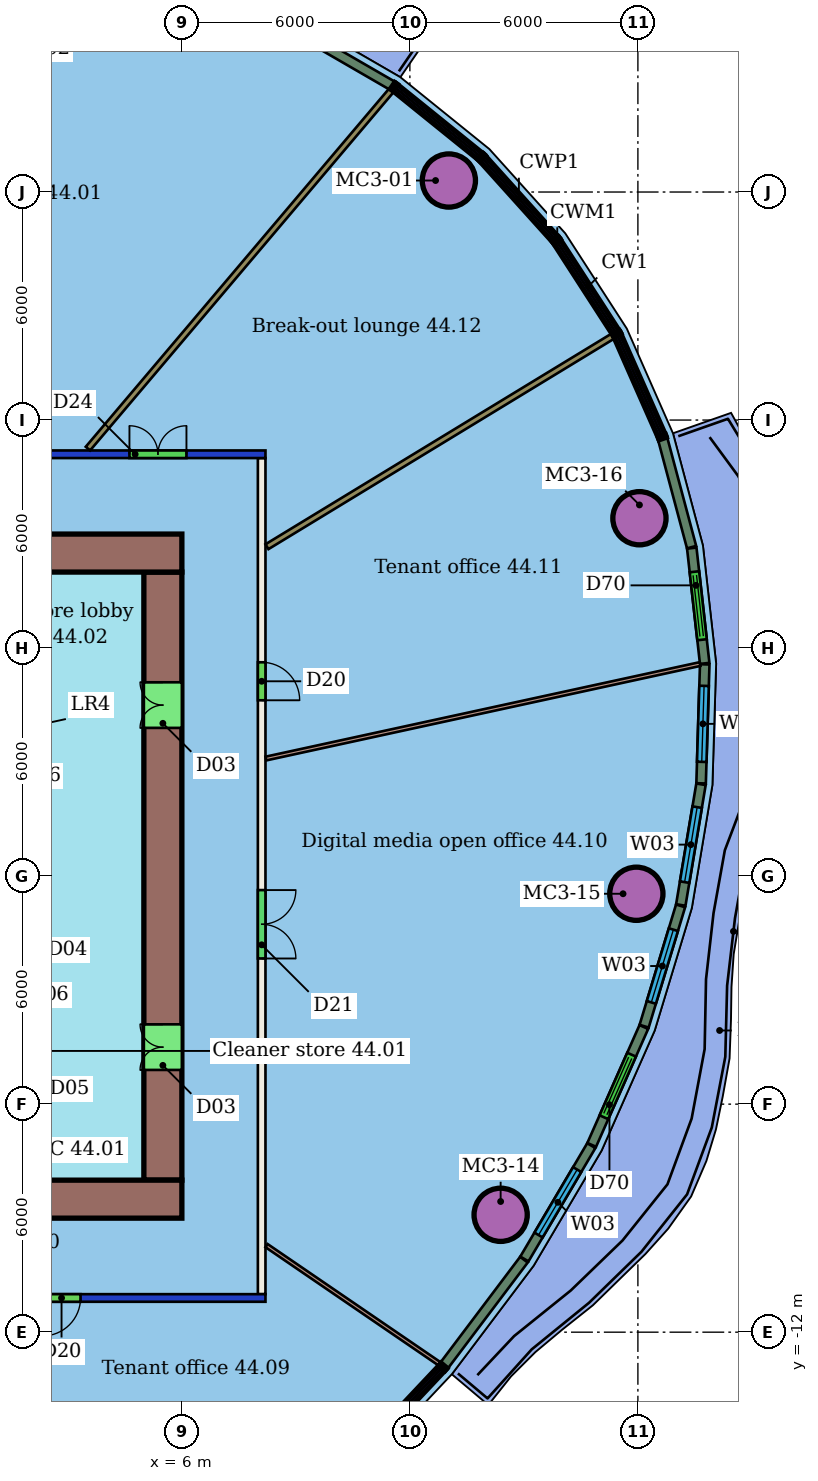
"""IFC4 building model, lengths in metres.
Left out: names, types, materials, properties, quantities, classifications, styles, units other than length and angle.
Written with IfcOpenShell. Run it as: python <this file> out.ifc"""

import sys

from ifc_helpers import new_model, si_unit, direction, frame, frame_2d, origin, origin_2d, place, context, subcontext, project, spatial, rectangle, hollow_circle, extrude, element, fill, save


model = new_model("IFC4")
c1 = context("Model", 3, precision=1e-05, world=origin(), true_north=direction((0.0, 1.0)))
c2 = subcontext(c1, "Body", "Model", "MODEL_VIEW")
j1 = project(units=[si_unit("LENGTHUNIT", "METRE"), si_unit("PLANEANGLEUNIT", "RADIAN")], contexts=[c1])
p1 = place(None, origin())
s1 = spatial("IfcSite", under=j1, at=p1, CompositionType="ELEMENT")
p2 = place(p1, origin())
s2 = spatial("IfcBuilding", under=s1, at=p2, CompositionType="ELEMENT")
p3 = place(p2, frame((0.0, 0.0, 183.0)))
s3 = spatial("IfcBuildingStorey", under=s2, at=p3, CompositionType="ELEMENT", Elevation=183.0)
for number, where, z_axis, x_axis in (
    (1, (13.026, 18.303, 0.0), (0.0, 0.0, 1.0), (1.0, 0.0, 0.0)),
    (2, (14.388, -8.912, 0.0), (0.0, 0.0, 1.0), (1.0, 0.0, 0.0)),
    (3, (17.959, -0.464, 0.0), (0.0, 0.0, 1.0), (1.0, 0.0, 0.0)),
    (4, (18.041, 9.417, 0.0), (0.0, 0.0, 1.0), (1.0, 0.0, 0.0)),
):
    element("IfcColumn", number, at=place(p3, frame(where, z_axis=z_axis, x_axis=x_axis)), inside=s3, PredefinedType="COLUMN", context=c2, shape_type="SweptSolid", body=[
        extrude(hollow_circle(Radius=0.7, WallThickness=0.05, at=origin_2d()), origin(), (0.0, 0.0, 1.0), 3.45),
    ])
p4 = place(p3, frame((8.2, -11.1, 0.0), z_axis=(0.0, 0.0, 1.0), x_axis=(-1.0, 0.0, 0.0)))
e5 = element("IfcWall", 5, at=p4, inside=s3, PredefinedType="PARTITIONING", context=c2, shape_type="SweptSolid", body=[
    extrude(rectangle(XDim=28.4, YDim=0.2, at=frame_2d((14.2, 0.0))), origin(), (0.0, 0.0, 1.0), 3.05),
])
p5 = place(p4, frame((22.184, 0.0, 0.0)))
e6 = element("IfcOpeningElement", 6, at=p5, cuts=e5, PredefinedType="OPENING", context=c2, shape_type="SweptSolid", body=[
    extrude(rectangle(XDim=1.8, YDim=2.1, at=frame_2d((0.9, 1.05))), frame((0.0, 0.11, 0.0), z_axis=(0.0, -1.0, 0.0), x_axis=(1.0, 0.0, 0.0)), (0.0, 0.0, 1.0), 0.22),
])
p6 = place(p4, frame((15.038, 0.0, 0.0)))
e7 = element("IfcOpeningElement", 7, at=p6, cuts=e5, PredefinedType="OPENING", context=c2, shape_type="SweptSolid", body=[
    extrude(rectangle(XDim=1.8, YDim=2.1, at=frame_2d((0.9, 1.05))), frame((0.0, 0.11, 0.0), z_axis=(0.0, -1.0, 0.0), x_axis=(1.0, 0.0, 0.0)), (0.0, 0.0, 1.0), 0.22),
])
p7 = place(p4, frame((4.866, 0.0, 0.0)))
e8 = element("IfcOpeningElement", 8, at=p7, cuts=e5, PredefinedType="OPENING", context=c2, shape_type="SweptSolid", body=[
    extrude(rectangle(XDim=1.0, YDim=2.1, at=frame_2d((0.5, 1.05))), frame((0.0, 0.11, 0.0), z_axis=(0.0, -1.0, 0.0), x_axis=(1.0, 0.0, 0.0)), (0.0, 0.0, 1.0), 0.22),
])
p8 = place(p3, frame((-20.2, 11.1, 0.0), z_axis=(0.0, 0.0, 1.0), x_axis=(1.0, 0.0, 0.0)))
e9 = element("IfcWall", 9, at=p8, inside=s3, PredefinedType="PARTITIONING", context=c2, shape_type="SweptSolid", body=[
    extrude(rectangle(XDim=28.4, YDim=0.2, at=frame_2d((14.2, 0.0))), origin(), (0.0, 0.0, 1.0), 3.05),
])
p9 = place(p8, frame((19.288, 0.0, 0.0)))
e10 = element("IfcOpeningElement", 10, at=p9, cuts=e9, PredefinedType="OPENING", context=c2, shape_type="SweptSolid", body=[
    extrude(rectangle(XDim=1.8, YDim=2.1, at=frame_2d((0.9, 1.05))), frame((0.0, 0.11, 0.0), z_axis=(0.0, -1.0, 0.0), x_axis=(1.0, 0.0, 0.0)), (0.0, 0.0, 1.0), 0.22),
])
p10 = place(p8, frame((9.583, 0.0, 0.0)))
e11 = element("IfcOpeningElement", 11, at=p10, cuts=e9, PredefinedType="OPENING", context=c2, shape_type="SweptSolid", body=[
    extrude(rectangle(XDim=1.5, YDim=2.1, at=frame_2d((0.75, 1.05))), frame((0.0, 0.11, 0.0), z_axis=(0.0, -1.0, 0.0), x_axis=(1.0, 0.0, 0.0)), (0.0, 0.0, 1.0), 0.22),
])
p11 = place(p8, frame((4.896, 0.0, 0.0)))
e12 = element("IfcOpeningElement", 12, at=p11, cuts=e9, PredefinedType="OPENING", context=c2, shape_type="SweptSolid", body=[
    extrude(rectangle(XDim=0.9, YDim=2.1, at=frame_2d((0.45, 1.05))), frame((0.0, 0.11, 0.0), z_axis=(0.0, -1.0, 0.0), x_axis=(1.0, 0.0, 0.0)), (0.0, 0.0, 1.0), 0.22),
])
p12 = place(p8, frame((24.821, 0.0, 0.0)))
e13 = element("IfcOpeningElement", 13, at=p12, cuts=e9, PredefinedType="OPENING", context=c2, shape_type="SweptSolid", body=[
    extrude(rectangle(XDim=1.5, YDim=2.1, at=frame_2d((0.75, 1.05))), frame((0.0, 0.11, 0.0), z_axis=(0.0, -1.0, 0.0), x_axis=(1.0, 0.0, 0.0)), (0.0, 0.0, 1.0), 0.22),
])
p13 = place(p3, frame((8.1, 11.0, 0.0), z_axis=(0.0, 0.0, 1.0), x_axis=(0.0, -1.0, 0.0)))
e14 = element("IfcWall", 14, at=p13, inside=s3, PredefinedType="PARTITIONING", context=c2, shape_type="SweptSolid", body=[
    extrude(rectangle(XDim=22.0, YDim=0.2, at=frame_2d((11.0, 0.0))), origin(), (0.0, 0.0, 1.0), 3.45),
])
p14 = place(p13, frame((11.367, 0.0, 0.0)))
e15 = element("IfcOpeningElement", 15, at=p14, cuts=e14, PredefinedType="OPENING", context=c2, shape_type="SweptSolid", body=[
    extrude(rectangle(XDim=1.8, YDim=2.1, at=frame_2d((0.9, 1.05))), frame((0.0, 0.11, 0.0), z_axis=(0.0, -1.0, 0.0), x_axis=(1.0, 0.0, 0.0)), (0.0, 0.0, 1.0), 0.22),
])
p15 = place(p13, frame((5.373, 0.0, 0.0)))
e16 = element("IfcOpeningElement", 16, at=p15, cuts=e14, PredefinedType="OPENING", context=c2, shape_type="SweptSolid", body=[
    extrude(rectangle(XDim=1.0, YDim=2.1, at=frame_2d((0.5, 1.05))), frame((0.0, 0.11, 0.0), z_axis=(0.0, -1.0, 0.0), x_axis=(1.0, 0.0, 0.0)), (0.0, 0.0, 1.0), 0.22),
])
p16 = place(p3, frame((11.509, 20.671, 0.0), z_axis=(0.0, 0.0, 1.0), x_axis=(-0.646338339336, -0.763050949219, 0.0)))
e17 = element("IfcWall", 17, at=p16, inside=s3, PredefinedType="PARTITIONING", context=c2, shape_type="SweptSolid", body=[
    extrude(rectangle(XDim=12.348, YDim=0.15, at=frame_2d((6.174, 0.0))), origin(), (0.0, 0.0, 1.0), 3.45),
])
p17 = place(p3, frame((4.636, -19.79, 0.0), z_axis=(0.0, 0.0, 1.0), x_axis=(-0.473408054694, 0.880843240169, 0.0)))
e18 = element("IfcWall", 18, at=p17, inside=s3, PredefinedType="PARTITIONING", context=c2, shape_type="SweptSolid", body=[
    extrude(rectangle(XDim=9.725, YDim=0.1, at=frame_2d((4.863, 0.0))), origin(), (0.0, 0.0, 1.0), 3.45),
])
p18 = place(p3, frame((12.779, -12.832, 0.0), z_axis=(0.0, 0.0, 1.0), x_axis=(-0.825651519224, 0.564180439933, 0.0)))
e19 = element("IfcWall", 19, at=p18, inside=s3, PredefinedType="PARTITIONING", context=c2, shape_type="SweptSolid", body=[
    extrude(rectangle(XDim=5.512, YDim=0.1, at=frame_2d((2.756, 0.0))), origin(), (0.0, 0.0, 1.0), 3.45),
])
p19 = place(p3, frame((19.634, 5.58, 0.0), z_axis=(0.0, 0.0, 1.0), x_axis=(-0.977119787855, -0.212689727497, 0.0)))
e20 = element("IfcWall", 20, at=p19, inside=s3, PredefinedType="PARTITIONING", context=c2, shape_type="SweptSolid", body=[
    extrude(rectangle(XDim=11.691, YDim=0.1, at=frame_2d((5.846, 0.0))), origin(), (0.0, 0.0, 1.0), 3.45),
])
p20 = place(p3, frame((17.335, 14.204, 0.0), z_axis=(0.0, 0.0, 1.0), x_axis=(-0.854194128167, -0.51995422049, 0.0)))
e21 = element("IfcWall", 21, at=p20, inside=s3, PredefinedType="PARTITIONING", context=c2, shape_type="SweptSolid", body=[
    extrude(rectangle(XDim=10.648, YDim=0.15, at=frame_2d((5.324, 0.0))), origin(), (0.0, 0.0, 1.0), 3.45),
])
p21 = place(p3, frame((11.532, 20.801, 0.0), z_axis=(0.0, 0.0, 1.0), x_axis=(-0.865519049877, 0.500876006912, 0.0)))
e22 = element("IfcWall", 22, at=p21, inside=s3, PredefinedType="SOLIDWALL", context=c2, shape_type="SweptSolid", body=[
    extrude(rectangle(XDim=2.943, YDim=0.25, at=frame_2d((1.471, 0.0))), origin(), (0.0, 0.0, 1.0), 3.1),
])
p22 = place(p3, frame((12.908, -12.869, 0.0), z_axis=(0.0, 0.0, 1.0), x_axis=(0.602031278038, 0.798472504388, 0.0)))
e23 = element("IfcWall", 23, at=p22, inside=s3, PredefinedType="SOLIDWALL", context=c2, shape_type="SweptSolid", body=[
    extrude(rectangle(XDim=3.477, YDim=0.25, at=frame_2d((1.739, 0.0))), origin(), (0.0, 0.0, 1.0), 3.1),
])
p23 = place(p3, frame((15.013, -10.074, 0.0), z_axis=(0.0, 0.0, 1.0), x_axis=(0.508356425064, 0.861146761648, 0.0)))
e24 = element("IfcWall", 24, at=p23, inside=s3, PredefinedType="SOLIDWALL", context=c2, shape_type="SweptSolid", body=[
    extrude(rectangle(XDim=3.464, YDim=0.25, at=frame_2d((1.732, 0.0))), origin(), (0.0, 0.0, 1.0), 3.1),
])
p24 = place(p23, frame((0.732, 0.0, 0.9)))
e25 = element("IfcOpeningElement", 25, at=p24, cuts=e24, PredefinedType="OPENING", context=c2, shape_type="SweptSolid", body=[
    extrude(rectangle(XDim=2.0, YDim=2.1, at=frame_2d((1.0, 1.05))), frame((0.0, 0.135, 0.0), z_axis=(0.0, -1.0, 0.0), x_axis=(1.0, 0.0, 0.0)), (0.0, 0.0, 1.0), 0.27),
])
p25 = place(p3, frame((16.784, -7.072, 0.0), z_axis=(0.0, 0.0, 1.0), x_axis=(0.404494434215, 0.914540459843, 0.0)))
e26 = element("IfcWall", 26, at=p25, inside=s3, PredefinedType="SOLIDWALL", context=c2, shape_type="SweptSolid", body=[
    extrude(rectangle(XDim=3.391, YDim=0.25, at=frame_2d((1.695, 0.0))), origin(), (0.0, 0.0, 1.0), 3.1),
])
p26 = place(p25, frame((0.795, 0.0, 0.0)))
e27 = element("IfcOpeningElement", 27, at=p26, cuts=e26, PredefinedType="OPENING", context=c2, shape_type="SweptSolid", body=[
    extrude(rectangle(XDim=1.8, YDim=2.4, at=frame_2d((0.9, 1.2))), frame((0.0, 0.135, 0.0), z_axis=(0.0, -1.0, 0.0), x_axis=(1.0, 0.0, 0.0)), (0.0, 0.0, 1.0), 0.27),
])
p27 = place(p3, frame((18.164, -3.949, 0.0), z_axis=(0.0, 0.0, 1.0), x_axis=(0.290048362563, 0.957011989149, 0.0)))
e28 = element("IfcWall", 28, at=p27, inside=s3, PredefinedType="SOLIDWALL", context=c2, shape_type="SweptSolid", body=[
    extrude(rectangle(XDim=3.308, YDim=0.25, at=frame_2d((1.654, 0.0))), origin(), (0.0, 0.0, 1.0), 3.1),
])
p28 = place(p27, frame((0.654, 0.0, 0.9)))
e29 = element("IfcOpeningElement", 29, at=p28, cuts=e28, PredefinedType="OPENING", context=c2, shape_type="SweptSolid", body=[
    extrude(rectangle(XDim=2.0, YDim=2.1, at=frame_2d((1.0, 1.05))), frame((0.0, 0.135, 0.0), z_axis=(0.0, -1.0, 0.0), x_axis=(1.0, 0.0, 0.0)), (0.0, 0.0, 1.0), 0.27),
])
p29 = place(p3, frame((19.129, -0.76, 0.0), z_axis=(0.0, 0.0, 1.0), x_axis=(0.165062898456, 0.986283042313, 0.0)))
e30 = element("IfcWall", 30, at=p29, inside=s3, PredefinedType="SOLIDWALL", context=c2, shape_type="SweptSolid", body=[
    extrude(rectangle(XDim=3.22, YDim=0.25, at=frame_2d((1.61, 0.0))), origin(), (0.0, 0.0, 1.0), 3.1),
])
p30 = place(p29, frame((0.61, 0.0, 0.9)))
e31 = element("IfcOpeningElement", 31, at=p30, cuts=e30, PredefinedType="OPENING", context=c2, shape_type="SweptSolid", body=[
    extrude(rectangle(XDim=2.0, YDim=2.1, at=frame_2d((1.0, 1.05))), frame((0.0, 0.135, 0.0), z_axis=(0.0, -1.0, 0.0), x_axis=(1.0, 0.0, 0.0)), (0.0, 0.0, 1.0), 0.27),
])
p31 = place(p3, frame((19.663, 2.441, 0.0), z_axis=(0.0, 0.0, 1.0), x_axis=(0.030631283966, 0.999530752125, 0.0)))
e32 = element("IfcWall", 32, at=p31, inside=s3, PredefinedType="SOLIDWALL", context=c2, shape_type="SweptSolid", body=[
    extrude(rectangle(XDim=3.132, YDim=0.25, at=frame_2d((1.566, 0.0))), origin(), (0.0, 0.0, 1.0), 3.1),
])
p32 = place(p31, frame((0.566, 0.0, 0.9)))
e33 = element("IfcOpeningElement", 33, at=p32, cuts=e32, PredefinedType="OPENING", context=c2, shape_type="SweptSolid", body=[
    extrude(rectangle(XDim=2.0, YDim=2.1, at=frame_2d((1.0, 1.05))), frame((0.0, 0.135, 0.0), z_axis=(0.0, -1.0, 0.0), x_axis=(1.0, 0.0, 0.0)), (0.0, 0.0, 1.0), 0.27),
])
p33 = place(p3, frame((19.758, 5.597, 0.0), z_axis=(0.0, 0.0, 1.0), x_axis=(-0.111450096945, 0.993770031693, 0.0)))
e34 = element("IfcWall", 34, at=p33, inside=s3, PredefinedType="SOLIDWALL", context=c2, shape_type="SweptSolid", body=[
    extrude(rectangle(XDim=3.052, YDim=0.25, at=frame_2d((1.526, 0.0))), origin(), (0.0, 0.0, 1.0), 3.1),
])
p34 = place(p33, frame((0.626, 0.0, 0.0)))
e35 = element("IfcOpeningElement", 35, at=p34, cuts=e34, PredefinedType="OPENING", context=c2, shape_type="SweptSolid", body=[
    extrude(rectangle(XDim=1.8, YDim=2.4, at=frame_2d((0.9, 1.2))), frame((0.0, 0.135, 0.0), z_axis=(0.0, -1.0, 0.0), x_axis=(1.0, 0.0, 0.0)), (0.0, 0.0, 1.0), 0.27),
])
p35 = place(p3, frame((19.413, 8.656, 0.0), z_axis=(0.0, 0.0, 1.0), x_axis=(-0.257791752942, 0.966200503061, 0.0)))
e36 = element("IfcWall", 36, at=p35, inside=s3, PredefinedType="SOLIDWALL", context=c2, shape_type="SweptSolid", body=[
    extrude(rectangle(XDim=2.942, YDim=0.25, at=frame_2d((1.471, 0.0))), origin(), (0.0, 0.0, 1.0), 3.1),
])
p36 = place(p3, frame((6.0, 8.5, 0.0), z_axis=(0.0, 0.0, 1.0), x_axis=(-1.0, 0.0, 0.0)))
e37 = element("IfcWall", 37, at=p36, inside=s3, PredefinedType="SHEAR", context=c2, shape_type="SweptSolid", body=[
    extrude(rectangle(XDim=12.0, YDim=1.0, at=frame_2d((6.0, 0.0))), origin(), (0.0, 0.0, 1.0), 3.3),
])
p37 = place(p36, frame((5.6, 0.0, 0.0)))
e38 = element("IfcOpeningElement", 38, at=p37, cuts=e37, PredefinedType="OPENING", context=c2, shape_type="SweptSolid", body=[
    extrude(rectangle(XDim=1.2, YDim=2.1, at=frame_2d((0.6, 1.05))), frame((0.0, 0.51, 0.0), z_axis=(0.0, -1.0, 0.0), x_axis=(1.0, 0.0, 0.0)), (0.0, 0.0, 1.0), 1.02),
])
p38 = place(p3, frame((-18.0, -8.5, 0.0), z_axis=(0.0, 0.0, 1.0), x_axis=(1.0, 0.0, 0.0)))
e39 = element("IfcWall", 39, at=p38, inside=s3, PredefinedType="SHEAR", context=c2, shape_type="SweptSolid", body=[
    extrude(rectangle(XDim=24.0, YDim=1.0, at=frame_2d((12.0, 0.0))), origin(), (0.0, 0.0, 1.0), 3.3),
])
p39 = place(p38, frame((6.0, 0.0, 0.0)))
e40 = element("IfcOpeningElement", 40, at=p39, cuts=e39, PredefinedType="OPENING", context=c2, shape_type="SweptSolid", body=[
    extrude(rectangle(XDim=1.2, YDim=2.1, at=frame_2d((0.6, 1.05))), frame((0.0, 0.51, 0.0), z_axis=(0.0, -1.0, 0.0), x_axis=(1.0, 0.0, 0.0)), (0.0, 0.0, 1.0), 1.02),
])
p40 = place(p3, frame((5.5, -8.0, 0.0), z_axis=(0.0, 0.0, 1.0), x_axis=(0.0, 1.0, 0.0)))
e41 = element("IfcWall", 41, at=p40, inside=s3, PredefinedType="SHEAR", context=c2, shape_type="SweptSolid", body=[
    extrude(rectangle(XDim=16.0, YDim=1.0, at=frame_2d((8.0, 0.0))), origin(), (0.0, 0.0, 1.0), 3.3),
])
p41 = place(p40, frame((2.9, 0.0, 0.0)))
e42 = element("IfcOpeningElement", 42, at=p41, cuts=e41, PredefinedType="OPENING", context=c2, shape_type="SweptSolid", body=[
    extrude(rectangle(XDim=1.2, YDim=2.1, at=frame_2d((0.6, 1.05))), frame((0.0, 0.51, 0.0), z_axis=(0.0, -1.0, 0.0), x_axis=(1.0, 0.0, 0.0)), (0.0, 0.0, 1.0), 1.02),
])
p42 = place(p40, frame((11.9, 0.0, 0.0)))
e43 = element("IfcOpeningElement", 43, at=p42, cuts=e41, PredefinedType="OPENING", context=c2, shape_type="SweptSolid", body=[
    extrude(rectangle(XDim=1.2, YDim=2.1, at=frame_2d((0.6, 1.05))), frame((0.0, 0.51, 0.0), z_axis=(0.0, -1.0, 0.0), x_axis=(1.0, 0.0, 0.0)), (0.0, 0.0, 1.0), 1.02),
])
p43 = place(p7, origin())
e44 = element("IfcDoor", 44, at=p43, inside=s3, OperationType="SINGLE_SWING_RIGHT", PredefinedType="DOOR", context=c2, shape_type="SweptSolid", body=[
    extrude(rectangle(XDim=1.0, YDim=2.1, at=frame_2d((0.5, 1.05))), frame((0.0, 0.025, 0.0), z_axis=(0.0, -1.0, 0.0), x_axis=(1.0, 0.0, 0.0)), (0.0, 0.0, 1.0), 0.05),
])
fill(e8, e44)
p44 = place(p14, origin())
e45 = element("IfcDoor", 45, at=p44, inside=s3, OperationType="DOUBLE_DOOR_SINGLE_SWING", PredefinedType="DOOR", context=c2, shape_type="SweptSolid", body=[
    extrude(rectangle(XDim=1.8, YDim=2.1, at=frame_2d((0.9, 1.05))), frame((0.0, 0.025, 0.0), z_axis=(0.0, -1.0, 0.0), x_axis=(1.0, 0.0, 0.0)), (0.0, 0.0, 1.0), 0.05),
])
fill(e15, e45)
p45 = place(p15, origin())
e46 = element("IfcDoor", 46, at=p45, inside=s3, OperationType="SINGLE_SWING_RIGHT", PredefinedType="DOOR", context=c2, shape_type="SweptSolid", body=[
    extrude(rectangle(XDim=1.0, YDim=2.1, at=frame_2d((0.5, 1.05))), frame((0.0, 0.025, 0.0), z_axis=(0.0, -1.0, 0.0), x_axis=(1.0, 0.0, 0.0)), (0.0, 0.0, 1.0), 0.05),
])
fill(e16, e46)
p46 = place(p12, origin())
e47 = element("IfcDoor", 47, at=p46, inside=s3, OperationType="DOUBLE_DOOR_SINGLE_SWING", PredefinedType="DOOR", context=c2, shape_type="SweptSolid", body=[
    extrude(rectangle(XDim=1.5, YDim=2.1, at=frame_2d((0.75, 1.05))), frame((0.0, 0.025, 0.0), z_axis=(0.0, -1.0, 0.0), x_axis=(1.0, 0.0, 0.0)), (0.0, 0.0, 1.0), 0.05),
])
fill(e13, e47)
p47 = place(p24, origin())
e48 = element("IfcWindow", 48, at=p47, inside=s3, PartitioningType="SINGLE_PANEL", PredefinedType="WINDOW", context=c2, shape_type="SweptSolid", body=[
    extrude(rectangle(XDim=2.0, YDim=2.1, at=frame_2d((1.0, 1.05))), frame((0.0, 0.03, 0.0), z_axis=(0.0, -1.0, 0.0), x_axis=(1.0, 0.0, 0.0)), (0.0, 0.0, 1.0), 0.06),
])
fill(e25, e48)
p48 = place(p26, origin())
e49 = element("IfcDoor", 49, at=p48, inside=s3, OperationType="DOUBLE_DOOR_SLIDING", PredefinedType="DOOR", context=c2, shape_type="SweptSolid", body=[
    extrude(rectangle(XDim=1.8, YDim=2.4, at=frame_2d((0.9, 1.2))), frame((0.0, 0.025, 0.0), z_axis=(0.0, -1.0, 0.0), x_axis=(1.0, 0.0, 0.0)), (0.0, 0.0, 1.0), 0.05),
])
fill(e27, e49)
p49 = place(p28, origin())
e50 = element("IfcWindow", 50, at=p49, inside=s3, PartitioningType="SINGLE_PANEL", PredefinedType="WINDOW", context=c2, shape_type="SweptSolid", body=[
    extrude(rectangle(XDim=2.0, YDim=2.1, at=frame_2d((1.0, 1.05))), frame((0.0, 0.03, 0.0), z_axis=(0.0, -1.0, 0.0), x_axis=(1.0, 0.0, 0.0)), (0.0, 0.0, 1.0), 0.06),
])
fill(e29, e50)
p50 = place(p30, origin())
e51 = element("IfcWindow", 51, at=p50, inside=s3, PartitioningType="SINGLE_PANEL", PredefinedType="WINDOW", context=c2, shape_type="SweptSolid", body=[
    extrude(rectangle(XDim=2.0, YDim=2.1, at=frame_2d((1.0, 1.05))), frame((0.0, 0.03, 0.0), z_axis=(0.0, -1.0, 0.0), x_axis=(1.0, 0.0, 0.0)), (0.0, 0.0, 1.0), 0.06),
])
fill(e31, e51)
p51 = place(p32, origin())
e52 = element("IfcWindow", 52, at=p51, inside=s3, PartitioningType="SINGLE_PANEL", PredefinedType="WINDOW", context=c2, shape_type="SweptSolid", body=[
    extrude(rectangle(XDim=2.0, YDim=2.1, at=frame_2d((1.0, 1.05))), frame((0.0, 0.03, 0.0), z_axis=(0.0, -1.0, 0.0), x_axis=(1.0, 0.0, 0.0)), (0.0, 0.0, 1.0), 0.06),
])
fill(e33, e52)
p52 = place(p34, origin())
e53 = element("IfcDoor", 53, at=p52, inside=s3, OperationType="DOUBLE_DOOR_SLIDING", PredefinedType="DOOR", context=c2, shape_type="SweptSolid", body=[
    extrude(rectangle(XDim=1.8, YDim=2.4, at=frame_2d((0.9, 1.2))), frame((0.0, 0.025, 0.0), z_axis=(0.0, -1.0, 0.0), x_axis=(1.0, 0.0, 0.0)), (0.0, 0.0, 1.0), 0.05),
])
fill(e35, e53)
p53 = place(p41, origin())
e54 = element("IfcDoor", 54, at=p53, inside=s3, OperationType="DOUBLE_DOOR_SINGLE_SWING", PredefinedType="NOTDEFINED", context=c2, shape_type="SweptSolid", body=[
    extrude(rectangle(XDim=1.2, YDim=2.1, at=frame_2d((0.6, 1.05))), frame((0.0, 0.025, 0.0), z_axis=(0.0, -1.0, 0.0), x_axis=(1.0, 0.0, 0.0)), (0.0, 0.0, 1.0), 0.05),
])
fill(e42, e54)
p54 = place(p42, origin())
e55 = element("IfcDoor", 55, at=p54, inside=s3, OperationType="DOUBLE_DOOR_SINGLE_SWING", PredefinedType="NOTDEFINED", context=c2, shape_type="SweptSolid", body=[
    extrude(rectangle(XDim=1.2, YDim=2.1, at=frame_2d((0.6, 1.05))), frame((0.0, 0.025, 0.0), z_axis=(0.0, -1.0, 0.0), x_axis=(1.0, 0.0, 0.0)), (0.0, 0.0, 1.0), 0.05),
])
fill(e43, e55)
save(model, sys.argv[1])
